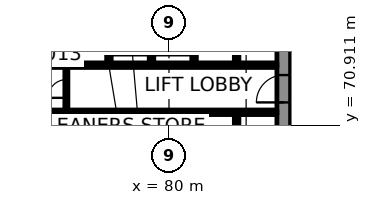
"""IFC4 building model, lengths in metres.
Left out: names, types, materials, properties, quantities, classifications, styles, units other than length and angle.
Written with IfcOpenShell. Run it as: python <this file> out.ifc"""

import sys

from ifc_helpers import new_model, si_unit, direction, frame, frame_2d, origin, place, context, subcontext, project, spatial, rectangle, extrude, element, fill, save


model = new_model("IFC4")
c1 = context("Model", 3, precision=1e-05, world=origin(), true_north=direction((0.0, 1.0)))
c2 = subcontext(c1, "Body", "Model", "MODEL_VIEW")
j1 = project(units=[si_unit("LENGTHUNIT", "METRE"), si_unit("PLANEANGLEUNIT", "RADIAN")], contexts=[c1])
p1 = place(None, origin())
s1 = spatial("IfcSite", under=j1, at=p1, CompositionType="ELEMENT")
p2 = place(p1, origin())
s2 = spatial("IfcBuilding", under=s1, at=p2, CompositionType="ELEMENT")
p3 = place(p2, origin())
s3 = spatial("IfcBuildingStorey", under=s2, at=p3, CompositionType="ELEMENT", Elevation=0.0)
p4 = place(p3, frame((87.55, 66.9, 0.0), z_axis=(0.0, 0.0, 1.0), x_axis=(0.0, 1.0, 0.0)))
e1 = element("IfcWall", 1, at=p4, inside=s3, PredefinedType="SHEAR", context=c2, shape_type="SweptSolid", body=[
    extrude(rectangle(XDim=16.2, YDim=0.9, at=frame_2d((8.1, 0.0))), origin(), (0.0, 0.0, 1.0), 7.7),
])
p5 = place(p4, frame((5.5, 0.0, 0.0)))
e2 = element("IfcOpeningElement", 2, at=p5, cuts=e1, PredefinedType="OPENING", context=c2, shape_type="SweptSolid", body=[
    extrude(rectangle(XDim=1.8, YDim=2.1, at=frame_2d((0.9, 1.05))), frame((0.0, 0.46, 0.0), z_axis=(0.0, -1.0, 0.0), x_axis=(1.0, 0.0, 0.0)), (0.0, 0.0, 1.0), 0.92),
])
p6 = place(p4, frame((11.738, 0.0, 0.0)))
e3 = element("IfcOpeningElement", 3, at=p6, cuts=e1, PredefinedType="OPENING", context=c2, shape_type="SweptSolid", body=[
    extrude(rectangle(XDim=0.9, YDim=2.1, at=frame_2d((0.45, 1.05))), frame((0.0, 0.46, 0.0), z_axis=(0.0, -1.0, 0.0), x_axis=(1.0, 0.0, 0.0)), (0.0, 0.0, 1.0), 0.92),
])
p7 = place(p3, frame((70.3, 71.75, 0.0), z_axis=(0.0, 0.0, 1.0), x_axis=(1.0, 0.0, 0.0)))
e4 = element("IfcWall", 4, at=p7, inside=s3, PredefinedType="SHEAR", context=c2, shape_type="SweptSolid", body=[
    extrude(rectangle(XDim=16.8, YDim=0.3, at=frame_2d((8.4, 0.0))), origin(), (0.0, 0.0, 1.0), 7.7),
])
p8 = place(p7, frame((1.0, 0.0, 0.0)))
e5 = element("IfcOpeningElement", 5, at=p8, cuts=e4, PredefinedType="OPENING", context=c2, shape_type="SweptSolid", body=[
    extrude(rectangle(XDim=1.1, YDim=2.1, at=frame_2d((0.55, 1.05))), frame((0.0, 0.16, 0.0), z_axis=(0.0, -1.0, 0.0), x_axis=(1.0, 0.0, 0.0)), (0.0, 0.0, 1.0), 0.32),
])
p9 = place(p7, frame((3.8, 0.0, 0.0)))
e6 = element("IfcOpeningElement", 6, at=p9, cuts=e4, PredefinedType="OPENING", context=c2, shape_type="SweptSolid", body=[
    extrude(rectangle(XDim=1.1, YDim=2.1, at=frame_2d((0.55, 1.05))), frame((0.0, 0.16, 0.0), z_axis=(0.0, -1.0, 0.0), x_axis=(1.0, 0.0, 0.0)), (0.0, 0.0, 1.0), 0.32),
])
p10 = place(p7, frame((6.6, 0.0, 0.0)))
e7 = element("IfcOpeningElement", 7, at=p10, cuts=e4, PredefinedType="OPENING", context=c2, shape_type="SweptSolid", body=[
    extrude(rectangle(XDim=1.1, YDim=2.1, at=frame_2d((0.55, 1.05))), frame((0.0, 0.16, 0.0), z_axis=(0.0, -1.0, 0.0), x_axis=(1.0, 0.0, 0.0)), (0.0, 0.0, 1.0), 0.32),
])
p11 = place(p7, frame((9.4, 0.0, 0.0)))
e8 = element("IfcOpeningElement", 8, at=p11, cuts=e4, PredefinedType="OPENING", context=c2, shape_type="SweptSolid", body=[
    extrude(rectangle(XDim=1.1, YDim=2.1, at=frame_2d((0.55, 1.05))), frame((0.0, 0.16, 0.0), z_axis=(0.0, -1.0, 0.0), x_axis=(1.0, 0.0, 0.0)), (0.0, 0.0, 1.0), 0.32),
])
p12 = place(p7, frame((12.2, 0.0, 0.0)))
e9 = element("IfcOpeningElement", 9, at=p12, cuts=e4, PredefinedType="OPENING", context=c2, shape_type="SweptSolid", body=[
    extrude(rectangle(XDim=1.1, YDim=2.1, at=frame_2d((0.55, 1.05))), frame((0.0, 0.16, 0.0), z_axis=(0.0, -1.0, 0.0), x_axis=(1.0, 0.0, 0.0)), (0.0, 0.0, 1.0), 0.32),
])
p13 = place(p7, frame((14.925, 0.0, 0.0)))
e10 = element("IfcOpeningElement", 10, at=p13, cuts=e4, PredefinedType="OPENING", context=c2, shape_type="SweptSolid", body=[
    extrude(rectangle(XDim=1.1, YDim=2.1, at=frame_2d((0.55, 1.05))), frame((0.0, 0.16, 0.0), z_axis=(0.0, -1.0, 0.0), x_axis=(1.0, 0.0, 0.0)), (0.0, 0.0, 1.0), 0.32),
])
p14 = place(p3, frame((70.3, 74.85, 0.0), z_axis=(0.0, 0.0, 1.0), x_axis=(1.0, 0.0, 0.0)))
e11 = element("IfcWall", 11, at=p14, inside=s3, PredefinedType="SHEAR", context=c2, shape_type="SweptSolid", body=[
    extrude(rectangle(XDim=16.8, YDim=0.3, at=frame_2d((8.4, 0.0))), origin(), (0.0, 0.0, 1.0), 7.7),
])
p15 = place(p14, frame((3.8, 0.0, 0.0)))
e12 = element("IfcOpeningElement", 12, at=p15, cuts=e11, PredefinedType="OPENING", context=c2, shape_type="SweptSolid", body=[
    extrude(rectangle(XDim=1.1, YDim=2.1, at=frame_2d((0.55, 1.05))), frame((0.0, 0.16, 0.0), z_axis=(0.0, -1.0, 0.0), x_axis=(1.0, 0.0, 0.0)), (0.0, 0.0, 1.0), 0.32),
])
p16 = place(p14, frame((6.6, 0.0, 0.0)))
e13 = element("IfcOpeningElement", 13, at=p16, cuts=e11, PredefinedType="OPENING", context=c2, shape_type="SweptSolid", body=[
    extrude(rectangle(XDim=1.1, YDim=2.1, at=frame_2d((0.55, 1.05))), frame((0.0, 0.16, 0.0), z_axis=(0.0, -1.0, 0.0), x_axis=(1.0, 0.0, 0.0)), (0.0, 0.0, 1.0), 0.32),
])
p17 = place(p14, frame((9.4, 0.0, 0.0)))
e14 = element("IfcOpeningElement", 14, at=p17, cuts=e11, PredefinedType="OPENING", context=c2, shape_type="SweptSolid", body=[
    extrude(rectangle(XDim=1.1, YDim=2.1, at=frame_2d((0.55, 1.05))), frame((0.0, 0.16, 0.0), z_axis=(0.0, -1.0, 0.0), x_axis=(1.0, 0.0, 0.0)), (0.0, 0.0, 1.0), 0.32),
])
p18 = place(p14, frame((12.2, 0.0, 0.0)))
e15 = element("IfcOpeningElement", 15, at=p18, cuts=e11, PredefinedType="OPENING", context=c2, shape_type="SweptSolid", body=[
    extrude(rectangle(XDim=1.1, YDim=2.1, at=frame_2d((0.55, 1.05))), frame((0.0, 0.16, 0.0), z_axis=(0.0, -1.0, 0.0), x_axis=(1.0, 0.0, 0.0)), (0.0, 0.0, 1.0), 0.32),
])
p19 = place(p14, frame((14.925, 0.0, 0.0)))
e16 = element("IfcOpeningElement", 16, at=p19, cuts=e11, PredefinedType="OPENING", context=c2, shape_type="SweptSolid", body=[
    extrude(rectangle(XDim=1.1, YDim=2.1, at=frame_2d((0.55, 1.05))), frame((0.0, 0.16, 0.0), z_axis=(0.0, -1.0, 0.0), x_axis=(1.0, 0.0, 0.0)), (0.0, 0.0, 1.0), 0.32),
])
for number, where, z_axis, x_axis in (
    (17, (73.25, 69.0, 0.0), (0.0, 0.0, 1.0), (0.0, 1.0, 0.0)),
    (18, (73.25, 75.0, 0.0), (0.0, 0.0, 1.0), (0.0, 1.0, 0.0)),
    (19, (76.05, 69.0, 0.0), (0.0, 0.0, 1.0), (0.0, 1.0, 0.0)),
    (20, (76.05, 75.0, 0.0), (0.0, 0.0, 1.0), (0.0, 1.0, 0.0)),
    (21, (78.85, 69.0, 0.0), (0.0, 0.0, 1.0), (0.0, 1.0, 0.0)),
    (22, (78.85, 75.0, 0.0), (0.0, 0.0, 1.0), (0.0, 1.0, 0.0)),
    (23, (81.65, 69.0, 0.0), (0.0, 0.0, 1.0), (0.0, 1.0, 0.0)),
    (24, (81.65, 75.0, 0.0), (0.0, 0.0, 1.0), (0.0, 1.0, 0.0)),
    (25, (84.45, 69.0, 0.0), (0.0, 0.0, 1.0), (0.0, 1.0, 0.0)),
    (26, (84.45, 75.0, 0.0), (0.0, 0.0, 1.0), (0.0, 1.0, 0.0)),
):
    element("IfcWall", number, at=place(p3, frame(where, z_axis=z_axis, x_axis=x_axis)), inside=s3, PredefinedType="SHEAR", context=c2, shape_type="SweptSolid", body=[
        extrude(rectangle(XDim=2.6, YDim=0.3, at=frame_2d((1.3, 0.0))), origin(), (0.0, 0.0, 1.0), 7.7),
    ])
p20 = place(p3, frame((107.504, 60.451, 0.0), z_axis=(0.0, 0.0, 1.0), x_axis=(-0.500000550228, 0.86602508611, 0.0)))
e27 = element("IfcWall", 27, at=p20, inside=s3, PredefinedType="SOLIDWALL", context=c2, shape_type="SweptSolid", body=[
    extrude(rectangle(XDim=57.704, YDim=0.3, at=frame_2d((28.852, 0.0))), origin(), (0.0, 0.0, 1.0), 7.7),
])
p21 = place(p20, frame((56.104, 0.0, 0.0)))
e28 = element("IfcOpeningElement", 28, at=p21, cuts=e27, PredefinedType="OPENING", context=c2, shape_type="SweptSolid", body=[
    extrude(rectangle(XDim=1.2, YDim=2.4, at=frame_2d((0.6, 1.2))), frame((0.0, 0.16, 0.0), z_axis=(0.0, -1.0, 0.0), x_axis=(1.0, 0.0, 0.0)), (0.0, 0.0, 1.0), 0.32),
])
p22 = place(p20, frame((1.552, 0.0, 0.15)))
e29 = element("IfcOpeningElement", 29, at=p22, cuts=e27, PredefinedType="OPENING", context=c2, shape_type="SweptSolid", body=[
    extrude(rectangle(XDim=2.1, YDim=5.4, at=frame_2d((1.05, 2.7))), frame((0.0, 0.16, 0.0), z_axis=(0.0, -1.0, 0.0), x_axis=(1.0, 0.0, 0.0)), (0.0, 0.0, 1.0), 0.32),
])
p23 = place(p20, frame((4.052, 0.0, 0.15)))
e30 = element("IfcOpeningElement", 30, at=p23, cuts=e27, PredefinedType="OPENING", context=c2, shape_type="SweptSolid", body=[
    extrude(rectangle(XDim=2.1, YDim=5.4, at=frame_2d((1.05, 2.7))), frame((0.0, 0.16, 0.0), z_axis=(0.0, -1.0, 0.0), x_axis=(1.0, 0.0, 0.0)), (0.0, 0.0, 1.0), 0.32),
])
p24 = place(p20, frame((6.552, 0.0, 0.15)))
e31 = element("IfcOpeningElement", 31, at=p24, cuts=e27, PredefinedType="OPENING", context=c2, shape_type="SweptSolid", body=[
    extrude(rectangle(XDim=2.1, YDim=5.4, at=frame_2d((1.05, 2.7))), frame((0.0, 0.16, 0.0), z_axis=(0.0, -1.0, 0.0), x_axis=(1.0, 0.0, 0.0)), (0.0, 0.0, 1.0), 0.32),
])
p25 = place(p20, frame((9.052, 0.0, 0.15)))
e32 = element("IfcOpeningElement", 32, at=p25, cuts=e27, PredefinedType="OPENING", context=c2, shape_type="SweptSolid", body=[
    extrude(rectangle(XDim=2.1, YDim=5.4, at=frame_2d((1.05, 2.7))), frame((0.0, 0.16, 0.0), z_axis=(0.0, -1.0, 0.0), x_axis=(1.0, 0.0, 0.0)), (0.0, 0.0, 1.0), 0.32),
])
p26 = place(p20, frame((11.552, 0.0, 0.15)))
e33 = element("IfcOpeningElement", 33, at=p26, cuts=e27, PredefinedType="OPENING", context=c2, shape_type="SweptSolid", body=[
    extrude(rectangle(XDim=2.1, YDim=5.4, at=frame_2d((1.05, 2.7))), frame((0.0, 0.16, 0.0), z_axis=(0.0, -1.0, 0.0), x_axis=(1.0, 0.0, 0.0)), (0.0, 0.0, 1.0), 0.32),
])
p27 = place(p20, frame((14.052, 0.0, 0.15)))
e34 = element("IfcOpeningElement", 34, at=p27, cuts=e27, PredefinedType="OPENING", context=c2, shape_type="SweptSolid", body=[
    extrude(rectangle(XDim=2.1, YDim=5.4, at=frame_2d((1.05, 2.7))), frame((0.0, 0.16, 0.0), z_axis=(0.0, -1.0, 0.0), x_axis=(1.0, 0.0, 0.0)), (0.0, 0.0, 1.0), 0.32),
])
p28 = place(p20, frame((16.552, 0.0, 0.15)))
e35 = element("IfcOpeningElement", 35, at=p28, cuts=e27, PredefinedType="OPENING", context=c2, shape_type="SweptSolid", body=[
    extrude(rectangle(XDim=2.1, YDim=5.4, at=frame_2d((1.05, 2.7))), frame((0.0, 0.16, 0.0), z_axis=(0.0, -1.0, 0.0), x_axis=(1.0, 0.0, 0.0)), (0.0, 0.0, 1.0), 0.32),
])
p29 = place(p20, frame((19.052, 0.0, 0.15)))
e36 = element("IfcOpeningElement", 36, at=p29, cuts=e27, PredefinedType="OPENING", context=c2, shape_type="SweptSolid", body=[
    extrude(rectangle(XDim=2.1, YDim=5.4, at=frame_2d((1.05, 2.7))), frame((0.0, 0.16, 0.0), z_axis=(0.0, -1.0, 0.0), x_axis=(1.0, 0.0, 0.0)), (0.0, 0.0, 1.0), 0.32),
])
p30 = place(p20, frame((21.552, 0.0, 0.15)))
e37 = element("IfcOpeningElement", 37, at=p30, cuts=e27, PredefinedType="OPENING", context=c2, shape_type="SweptSolid", body=[
    extrude(rectangle(XDim=2.1, YDim=5.4, at=frame_2d((1.05, 2.7))), frame((0.0, 0.16, 0.0), z_axis=(0.0, -1.0, 0.0), x_axis=(1.0, 0.0, 0.0)), (0.0, 0.0, 1.0), 0.32),
])
p31 = place(p20, frame((24.052, 0.0, 0.15)))
e38 = element("IfcOpeningElement", 38, at=p31, cuts=e27, PredefinedType="OPENING", context=c2, shape_type="SweptSolid", body=[
    extrude(rectangle(XDim=2.1, YDim=5.4, at=frame_2d((1.05, 2.7))), frame((0.0, 0.16, 0.0), z_axis=(0.0, -1.0, 0.0), x_axis=(1.0, 0.0, 0.0)), (0.0, 0.0, 1.0), 0.32),
])
p32 = place(p20, frame((26.552, 0.0, 0.15)))
e39 = element("IfcOpeningElement", 39, at=p32, cuts=e27, PredefinedType="OPENING", context=c2, shape_type="SweptSolid", body=[
    extrude(rectangle(XDim=2.1, YDim=5.4, at=frame_2d((1.05, 2.7))), frame((0.0, 0.16, 0.0), z_axis=(0.0, -1.0, 0.0), x_axis=(1.0, 0.0, 0.0)), (0.0, 0.0, 1.0), 0.32),
])
p33 = place(p20, frame((29.052, 0.0, 0.15)))
e40 = element("IfcOpeningElement", 40, at=p33, cuts=e27, PredefinedType="OPENING", context=c2, shape_type="SweptSolid", body=[
    extrude(rectangle(XDim=2.1, YDim=5.4, at=frame_2d((1.05, 2.7))), frame((0.0, 0.16, 0.0), z_axis=(0.0, -1.0, 0.0), x_axis=(1.0, 0.0, 0.0)), (0.0, 0.0, 1.0), 0.32),
])
p34 = place(p20, frame((31.552, 0.0, 0.15)))
e41 = element("IfcOpeningElement", 41, at=p34, cuts=e27, PredefinedType="OPENING", context=c2, shape_type="SweptSolid", body=[
    extrude(rectangle(XDim=2.1, YDim=5.4, at=frame_2d((1.05, 2.7))), frame((0.0, 0.16, 0.0), z_axis=(0.0, -1.0, 0.0), x_axis=(1.0, 0.0, 0.0)), (0.0, 0.0, 1.0), 0.32),
])
p35 = place(p20, frame((34.052, 0.0, 0.15)))
e42 = element("IfcOpeningElement", 42, at=p35, cuts=e27, PredefinedType="OPENING", context=c2, shape_type="SweptSolid", body=[
    extrude(rectangle(XDim=2.1, YDim=5.4, at=frame_2d((1.05, 2.7))), frame((0.0, 0.16, 0.0), z_axis=(0.0, -1.0, 0.0), x_axis=(1.0, 0.0, 0.0)), (0.0, 0.0, 1.0), 0.32),
])
p36 = place(p20, frame((36.552, 0.0, 0.15)))
e43 = element("IfcOpeningElement", 43, at=p36, cuts=e27, PredefinedType="OPENING", context=c2, shape_type="SweptSolid", body=[
    extrude(rectangle(XDim=2.1, YDim=5.4, at=frame_2d((1.05, 2.7))), frame((0.0, 0.16, 0.0), z_axis=(0.0, -1.0, 0.0), x_axis=(1.0, 0.0, 0.0)), (0.0, 0.0, 1.0), 0.32),
])
p37 = place(p20, frame((39.052, 0.0, 0.15)))
e44 = element("IfcOpeningElement", 44, at=p37, cuts=e27, PredefinedType="OPENING", context=c2, shape_type="SweptSolid", body=[
    extrude(rectangle(XDim=2.1, YDim=5.4, at=frame_2d((1.05, 2.7))), frame((0.0, 0.16, 0.0), z_axis=(0.0, -1.0, 0.0), x_axis=(1.0, 0.0, 0.0)), (0.0, 0.0, 1.0), 0.32),
])
p38 = place(p20, frame((41.552, 0.0, 0.15)))
e45 = element("IfcOpeningElement", 45, at=p38, cuts=e27, PredefinedType="OPENING", context=c2, shape_type="SweptSolid", body=[
    extrude(rectangle(XDim=2.1, YDim=5.4, at=frame_2d((1.05, 2.7))), frame((0.0, 0.16, 0.0), z_axis=(0.0, -1.0, 0.0), x_axis=(1.0, 0.0, 0.0)), (0.0, 0.0, 1.0), 0.32),
])
p39 = place(p20, frame((44.052, 0.0, 0.15)))
e46 = element("IfcOpeningElement", 46, at=p39, cuts=e27, PredefinedType="OPENING", context=c2, shape_type="SweptSolid", body=[
    extrude(rectangle(XDim=2.1, YDim=5.4, at=frame_2d((1.05, 2.7))), frame((0.0, 0.16, 0.0), z_axis=(0.0, -1.0, 0.0), x_axis=(1.0, 0.0, 0.0)), (0.0, 0.0, 1.0), 0.32),
])
p40 = place(p20, frame((46.552, 0.0, 0.15)))
e47 = element("IfcOpeningElement", 47, at=p40, cuts=e27, PredefinedType="OPENING", context=c2, shape_type="SweptSolid", body=[
    extrude(rectangle(XDim=2.1, YDim=5.4, at=frame_2d((1.05, 2.7))), frame((0.0, 0.16, 0.0), z_axis=(0.0, -1.0, 0.0), x_axis=(1.0, 0.0, 0.0)), (0.0, 0.0, 1.0), 0.32),
])
p41 = place(p20, frame((49.052, 0.0, 0.15)))
e48 = element("IfcOpeningElement", 48, at=p41, cuts=e27, PredefinedType="OPENING", context=c2, shape_type="SweptSolid", body=[
    extrude(rectangle(XDim=2.1, YDim=5.4, at=frame_2d((1.05, 2.7))), frame((0.0, 0.16, 0.0), z_axis=(0.0, -1.0, 0.0), x_axis=(1.0, 0.0, 0.0)), (0.0, 0.0, 1.0), 0.32),
])
p42 = place(p20, frame((51.552, 0.0, 0.15)))
e49 = element("IfcOpeningElement", 49, at=p42, cuts=e27, PredefinedType="OPENING", context=c2, shape_type="SweptSolid", body=[
    extrude(rectangle(XDim=2.1, YDim=5.4, at=frame_2d((1.05, 2.7))), frame((0.0, 0.16, 0.0), z_axis=(0.0, -1.0, 0.0), x_axis=(1.0, 0.0, 0.0)), (0.0, 0.0, 1.0), 0.32),
])
p43 = place(p3, frame((73.25, 71.9, 0.0), z_axis=(0.0, 0.0, 1.0), x_axis=(0.0, 1.0, 0.0)))
e50 = element("IfcWall", 50, at=p43, inside=s3, PredefinedType="PARTITIONING", context=c2, shape_type="SweptSolid", body=[
    extrude(rectangle(XDim=2.8, YDim=0.2, at=frame_2d((1.4, 0.0))), origin(), (0.0, 0.0, 1.0), 7.7),
])
p44 = place(p43, frame((0.8, 0.0, 0.0)))
e51 = element("IfcOpeningElement", 51, at=p44, cuts=e50, PredefinedType="OPENING", context=c2, shape_type="SweptSolid", body=[
    extrude(rectangle(XDim=1.2, YDim=2.1, at=frame_2d((0.6, 1.05))), frame((0.0, 0.11, 0.0), z_axis=(0.0, -1.0, 0.0), x_axis=(1.0, 0.0, 0.0)), (0.0, 0.0, 1.0), 0.22),
])
p45 = place(p3, frame((107.106, 62.36, 0.0), z_axis=(0.0, 0.0, 1.0), x_axis=(-0.49999992739, 0.866025445706, 0.0)))
e52 = element("IfcWall", 52, at=p45, inside=s3, PredefinedType="SOLIDWALL", context=c2, shape_type="SweptSolid", body=[
    extrude(rectangle(XDim=54.0, YDim=0.4, at=frame_2d((27.0, 0.0))), origin(), (0.0, 0.0, 1.0), 7.64),
])
p46 = place(p3, frame((112.456, 65.794, 0.0), z_axis=(0.0, 0.0, 1.0), x_axis=(-0.499998559706, 0.866026235337, 0.0)))
e53 = element("IfcWall", 53, at=p46, inside=s3, PredefinedType="PARTITIONING", context=c2, shape_type="SweptSolid", body=[
    extrude(rectangle(XDim=53.4, YDim=0.2, at=frame_2d((26.7, 0.0))), origin(), (0.0, 0.0, 1.0), 7.64),
])
p47 = place(p46, frame((12.6, 0.0, 0.0)))
e54 = element("IfcOpeningElement", 54, at=p47, cuts=e53, PredefinedType="OPENING", context=c2, shape_type="SweptSolid", body=[
    extrude(rectangle(XDim=1.8, YDim=2.1, at=frame_2d((0.9, 1.05))), frame((0.0, 0.11, 0.0), z_axis=(0.0, -1.0, 0.0), x_axis=(1.0, 0.0, 0.0)), (0.0, 0.0, 1.0), 0.22),
])
p48 = place(p46, frame((25.8, 0.0, 0.0)))
e55 = element("IfcOpeningElement", 55, at=p48, cuts=e53, PredefinedType="OPENING", context=c2, shape_type="SweptSolid", body=[
    extrude(rectangle(XDim=1.8, YDim=2.1, at=frame_2d((0.9, 1.05))), frame((0.0, 0.11, 0.0), z_axis=(0.0, -1.0, 0.0), x_axis=(1.0, 0.0, 0.0)), (0.0, 0.0, 1.0), 0.22),
])
p49 = place(p46, frame((35.0, 0.0, 0.0)))
e56 = element("IfcOpeningElement", 56, at=p49, cuts=e53, PredefinedType="OPENING", context=c2, shape_type="SweptSolid", body=[
    extrude(rectangle(XDim=1.0, YDim=2.1, at=frame_2d((0.5, 1.05))), frame((0.0, 0.11, 0.0), z_axis=(0.0, -1.0, 0.0), x_axis=(1.0, 0.0, 0.0)), (0.0, 0.0, 1.0), 0.22),
])
p50 = place(p46, frame((45.75, 0.0, 0.0)))
e57 = element("IfcOpeningElement", 57, at=p50, cuts=e53, PredefinedType="OPENING", context=c2, shape_type="SweptSolid", body=[
    extrude(rectangle(XDim=1.8, YDim=2.1, at=frame_2d((0.9, 1.05))), frame((0.0, 0.11, 0.0), z_axis=(0.0, -1.0, 0.0), x_axis=(1.0, 0.0, 0.0)), (0.0, 0.0, 1.0), 0.22),
])
p51 = place(p8, origin())
e58 = element("IfcDoor", 58, at=p51, inside=s3, OperationType="DOUBLE_DOOR_SLIDING", PredefinedType="DOOR", context=c2, shape_type="SweptSolid", body=[
    extrude(rectangle(XDim=1.1, YDim=2.1, at=frame_2d((0.55, 1.05))), frame((0.0, 0.025, 0.0), z_axis=(0.0, -1.0, 0.0), x_axis=(1.0, 0.0, 0.0)), (0.0, 0.0, 1.0), 0.05),
])
fill(e5, e58)
p52 = place(p9, origin())
e59 = element("IfcDoor", 59, at=p52, inside=s3, OperationType="DOUBLE_DOOR_SLIDING", PredefinedType="DOOR", context=c2, shape_type="SweptSolid", body=[
    extrude(rectangle(XDim=1.1, YDim=2.1, at=frame_2d((0.55, 1.05))), frame((0.0, 0.025, 0.0), z_axis=(0.0, -1.0, 0.0), x_axis=(1.0, 0.0, 0.0)), (0.0, 0.0, 1.0), 0.05),
])
fill(e6, e59)
p53 = place(p10, origin())
e60 = element("IfcDoor", 60, at=p53, inside=s3, OperationType="DOUBLE_DOOR_SLIDING", PredefinedType="DOOR", context=c2, shape_type="SweptSolid", body=[
    extrude(rectangle(XDim=1.1, YDim=2.1, at=frame_2d((0.55, 1.05))), frame((0.0, 0.025, 0.0), z_axis=(0.0, -1.0, 0.0), x_axis=(1.0, 0.0, 0.0)), (0.0, 0.0, 1.0), 0.05),
])
fill(e7, e60)
p54 = place(p11, origin())
e61 = element("IfcDoor", 61, at=p54, inside=s3, OperationType="DOUBLE_DOOR_SLIDING", PredefinedType="DOOR", context=c2, shape_type="SweptSolid", body=[
    extrude(rectangle(XDim=1.1, YDim=2.1, at=frame_2d((0.55, 1.05))), frame((0.0, 0.025, 0.0), z_axis=(0.0, -1.0, 0.0), x_axis=(1.0, 0.0, 0.0)), (0.0, 0.0, 1.0), 0.05),
])
fill(e8, e61)
p55 = place(p12, origin())
e62 = element("IfcDoor", 62, at=p55, inside=s3, OperationType="DOUBLE_DOOR_SLIDING", PredefinedType="DOOR", context=c2, shape_type="SweptSolid", body=[
    extrude(rectangle(XDim=1.1, YDim=2.1, at=frame_2d((0.55, 1.05))), frame((0.0, 0.025, 0.0), z_axis=(0.0, -1.0, 0.0), x_axis=(1.0, 0.0, 0.0)), (0.0, 0.0, 1.0), 0.05),
])
fill(e9, e62)
p56 = place(p13, origin())
e63 = element("IfcDoor", 63, at=p56, inside=s3, OperationType="DOUBLE_DOOR_SLIDING", PredefinedType="DOOR", context=c2, shape_type="SweptSolid", body=[
    extrude(rectangle(XDim=1.1, YDim=2.1, at=frame_2d((0.55, 1.05))), frame((0.0, 0.025, 0.0), z_axis=(0.0, -1.0, 0.0), x_axis=(1.0, 0.0, 0.0)), (0.0, 0.0, 1.0), 0.05),
])
fill(e10, e63)
p57 = place(p15, origin())
e64 = element("IfcDoor", 64, at=p57, inside=s3, OperationType="DOUBLE_DOOR_SLIDING", PredefinedType="DOOR", context=c2, shape_type="SweptSolid", body=[
    extrude(rectangle(XDim=1.1, YDim=2.1, at=frame_2d((0.55, 1.05))), frame((0.0, 0.025, 0.0), z_axis=(0.0, -1.0, 0.0), x_axis=(1.0, 0.0, 0.0)), (0.0, 0.0, 1.0), 0.05),
])
fill(e12, e64)
p58 = place(p16, origin())
e65 = element("IfcDoor", 65, at=p58, inside=s3, OperationType="DOUBLE_DOOR_SLIDING", PredefinedType="DOOR", context=c2, shape_type="SweptSolid", body=[
    extrude(rectangle(XDim=1.1, YDim=2.1, at=frame_2d((0.55, 1.05))), frame((0.0, 0.025, 0.0), z_axis=(0.0, -1.0, 0.0), x_axis=(1.0, 0.0, 0.0)), (0.0, 0.0, 1.0), 0.05),
])
fill(e13, e65)
p59 = place(p17, origin())
e66 = element("IfcDoor", 66, at=p59, inside=s3, OperationType="DOUBLE_DOOR_SLIDING", PredefinedType="DOOR", context=c2, shape_type="SweptSolid", body=[
    extrude(rectangle(XDim=1.1, YDim=2.1, at=frame_2d((0.55, 1.05))), frame((0.0, 0.025, 0.0), z_axis=(0.0, -1.0, 0.0), x_axis=(1.0, 0.0, 0.0)), (0.0, 0.0, 1.0), 0.05),
])
fill(e14, e66)
p60 = place(p18, origin())
e67 = element("IfcDoor", 67, at=p60, inside=s3, OperationType="DOUBLE_DOOR_SLIDING", PredefinedType="DOOR", context=c2, shape_type="SweptSolid", body=[
    extrude(rectangle(XDim=1.1, YDim=2.1, at=frame_2d((0.55, 1.05))), frame((0.0, 0.025, 0.0), z_axis=(0.0, -1.0, 0.0), x_axis=(1.0, 0.0, 0.0)), (0.0, 0.0, 1.0), 0.05),
])
fill(e15, e67)
p61 = place(p19, origin())
e68 = element("IfcDoor", 68, at=p61, inside=s3, OperationType="DOUBLE_DOOR_SLIDING", PredefinedType="DOOR", context=c2, shape_type="SweptSolid", body=[
    extrude(rectangle(XDim=1.1, YDim=2.1, at=frame_2d((0.55, 1.05))), frame((0.0, 0.025, 0.0), z_axis=(0.0, -1.0, 0.0), x_axis=(1.0, 0.0, 0.0)), (0.0, 0.0, 1.0), 0.05),
])
fill(e16, e68)
p62 = place(p44, origin())
e69 = element("IfcDoor", 69, at=p62, inside=s3, OperationType="SINGLE_SWING_LEFT", PredefinedType="DOOR", context=c2, shape_type="SweptSolid", body=[
    extrude(rectangle(XDim=1.2, YDim=2.1, at=frame_2d((0.6, 1.05))), frame((0.0, 0.025, 0.0), z_axis=(0.0, -1.0, 0.0), x_axis=(1.0, 0.0, 0.0)), (0.0, 0.0, 1.0), 0.05),
])
fill(e51, e69)
p63 = place(p5, origin())
e70 = element("IfcDoor", 70, at=p63, inside=s3, OperationType="SINGLE_SWING_RIGHT", PredefinedType="DOOR", context=c2, shape_type="SweptSolid", body=[
    extrude(rectangle(XDim=1.8, YDim=2.1, at=frame_2d((0.9, 1.05))), frame((0.0, 0.17, 0.0), z_axis=(0.0, -1.0, 0.0), x_axis=(1.0, 0.0, 0.0)), (0.0, 0.0, 1.0), 0.34),
])
fill(e2, e70)
save(model, sys.argv[1])
